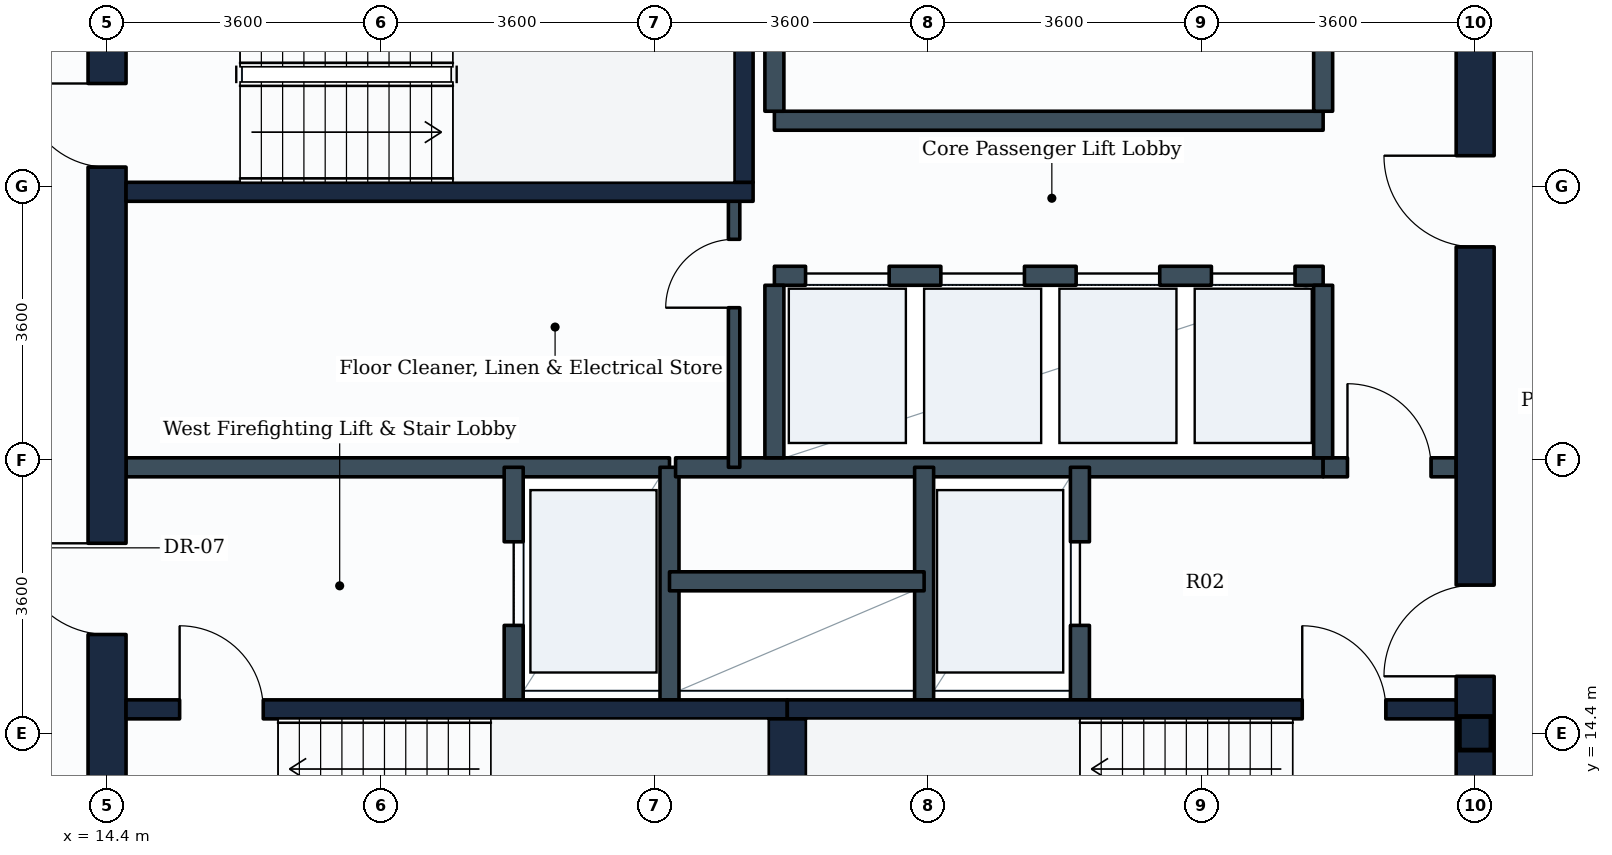
"""IFC4 building model, lengths in metres.
Left out: names, types, materials, properties, quantities, classifications, styles, units other than length and angle.
Written with IfcOpenShell. Run it as: python <this file> out.ifc"""

import sys

from ifc_helpers import new_model, si_unit, direction, frame, frame_2d, origin, origin_2d, place, context, subcontext, project, spatial, rectangle, i_section, extrude, element, fill, save


model = new_model("IFC4")
c1 = context("Model", 3, precision=1e-05, world=origin(), true_north=direction((0.0, 1.0)))
c2 = subcontext(c1, "Body", "Model", "MODEL_VIEW")
j1 = project(units=[si_unit("LENGTHUNIT", "METRE"), si_unit("PLANEANGLEUNIT", "RADIAN")], contexts=[c1])
p1 = place(None, origin())
s1 = spatial("IfcSite", under=j1, at=p1, CompositionType="ELEMENT")
p2 = place(p1, origin())
s2 = spatial("IfcBuilding", under=s1, at=p2, CompositionType="ELEMENT")
p3 = place(p2, frame((0.0, 0.0, 127.6)))
s3 = spatial("IfcBuildingStorey", under=s2, at=p3, CompositionType="ELEMENT", Elevation=127.6)
p4 = place(p3, frame((32.4, 14.4, 0.0), z_axis=(0.0, 0.0, 1.0), x_axis=(1.0, 0.0, 0.0)))
e1 = element("IfcColumn", 1, at=p4, inside=s3, PredefinedType="COLUMN", context=c2, shape_type="SweptSolid", body=[
    extrude(i_section(OverallWidth=0.416, OverallDepth=0.442, WebThickness=0.025, FlangeThickness=0.041, FilletRadius=0.015, at=origin_2d()), origin(), (0.0, 0.0, 1.0), 3.8),
])
p5 = place(p3, frame((14.4, 10.8, 0.0), z_axis=(0.0, 0.0, 1.0), x_axis=(0.0, 1.0, 0.0)))
e2 = element("IfcWall", 2, at=p5, inside=s3, PredefinedType="SHEAR", context=c2, shape_type="SweptSolid", body=[
    extrude(rectangle(XDim=14.4, YDim=0.5, at=frame_2d((7.2, 0.0))), origin(), (0.0, 0.0, 1.0), 3.55),
])
p6 = place(p5, frame((11.05, 0.0, 0.0)))
e3 = element("IfcOpeningElement", 3, at=p6, cuts=e2, PredefinedType="OPENING", context=c2, shape_type="SweptSolid", body=[
    extrude(rectangle(XDim=1.1, YDim=2.1, at=frame_2d((0.55, 1.05))), frame((0.0, 0.26, 0.0), z_axis=(0.0, -1.0, 0.0), x_axis=(1.0, 0.0, 0.0)), (0.0, 0.0, 1.0), 0.52),
])
p7 = place(p5, frame((4.9, 0.0, 0.0)))
e4 = element("IfcOpeningElement", 4, at=p7, cuts=e2, PredefinedType="OPENING", context=c2, shape_type="SweptSolid", body=[
    extrude(rectangle(XDim=1.2, YDim=2.1, at=frame_2d((0.6, 1.05))), frame((0.0, 0.26, 0.0), z_axis=(0.0, -1.0, 0.0), x_axis=(1.0, 0.0, 0.0)), (0.0, 0.0, 1.0), 0.52),
])
p8 = place(p3, frame((32.4, 10.8, 0.0), z_axis=(0.0, 0.0, 1.0), x_axis=(0.0, 1.0, 0.0)))
e5 = element("IfcWall", 5, at=p8, inside=s3, PredefinedType="SHEAR", context=c2, shape_type="SweptSolid", body=[
    extrude(rectangle(XDim=14.4, YDim=0.5, at=frame_2d((7.2, 0.0))), origin(), (0.0, 0.0, 1.0), 3.55),
])
p9 = place(p8, frame((4.35, 0.0, 0.0)))
e6 = element("IfcOpeningElement", 6, at=p9, cuts=e5, PredefinedType="OPENING", context=c2, shape_type="SweptSolid", body=[
    extrude(rectangle(XDim=1.2, YDim=2.1, at=frame_2d((0.6, 1.05))), frame((0.0, 0.26, 0.0), z_axis=(0.0, -1.0, 0.0), x_axis=(1.0, 0.0, 0.0)), (0.0, 0.0, 1.0), 0.52),
])
p10 = place(p8, frame((10.0, 0.0, 0.0)))
e7 = element("IfcOpeningElement", 7, at=p10, cuts=e5, PredefinedType="OPENING", context=c2, shape_type="SweptSolid", body=[
    extrude(rectangle(XDim=1.2, YDim=2.1, at=frame_2d((0.6, 1.05))), frame((0.0, 0.26, 0.0), z_axis=(0.0, -1.0, 0.0), x_axis=(1.0, 0.0, 0.0)), (0.0, 0.0, 1.0), 0.52),
])
p11 = place(p3, frame((14.65, 14.715, 0.0), z_axis=(0.0, 0.0, 1.0), x_axis=(1.0, 0.0, 0.0)))
e8 = element("IfcWall", 8, at=p11, inside=s3, PredefinedType="SHEAR", context=c2, shape_type="SweptSolid", body=[
    extrude(rectangle(XDim=8.7, YDim=0.25, at=frame_2d((4.35, 0.0))), origin(), (0.0, 0.0, 1.0), 3.55),
])
p12 = place(p11, frame((0.705, 0.0, 0.0)))
e9 = element("IfcOpeningElement", 9, at=p12, cuts=e8, PredefinedType="OPENING", context=c2, shape_type="SweptSolid", body=[
    extrude(rectangle(XDim=1.1, YDim=2.1, at=frame_2d((0.55, 1.05))), frame((0.0, 0.135, 0.0), z_axis=(0.0, -1.0, 0.0), x_axis=(1.0, 0.0, 0.0)), (0.0, 0.0, 1.0), 0.27),
])
p13 = place(p3, frame((23.35, 14.715, 0.0), z_axis=(0.0, 0.0, 1.0), x_axis=(1.0, 0.0, 0.0)))
e10 = element("IfcWall", 10, at=p13, inside=s3, PredefinedType="SHEAR", context=c2, shape_type="SweptSolid", body=[
    extrude(rectangle(XDim=8.8, YDim=0.25, at=frame_2d((4.4, 0.0))), origin(), (0.0, 0.0, 1.0), 3.55),
])
p14 = place(p13, frame((6.775, 0.0, 0.0)))
e11 = element("IfcOpeningElement", 11, at=p14, cuts=e10, PredefinedType="OPENING", context=c2, shape_type="SweptSolid", body=[
    extrude(rectangle(XDim=1.1, YDim=2.1, at=frame_2d((0.55, 1.05))), frame((0.0, 0.135, 0.0), z_axis=(0.0, -1.0, 0.0), x_axis=(1.0, 0.0, 0.0)), (0.0, 0.0, 1.0), 0.27),
])
p15 = place(p3, frame((23.35, 11.75, 0.0), z_axis=(0.0, 0.0, 1.0), x_axis=(0.0, 1.0, 0.0)))
e12 = element("IfcWall", 12, at=p15, inside=s3, PredefinedType="SHEAR", context=c2, shape_type="SweptSolid", body=[
    extrude(rectangle(XDim=2.84, YDim=0.5, at=frame_2d((1.42, 0.0))), origin(), (0.0, 0.0, 1.0), 3.55),
])
p16 = place(p3, frame((14.65, 21.525, 0.0), z_axis=(0.0, 0.0, 1.0), x_axis=(1.0, 0.0, 0.0)))
e13 = element("IfcWall", 13, at=p16, inside=s3, PredefinedType="SHEAR", context=c2, shape_type="SweptSolid", body=[
    extrude(rectangle(XDim=8.25, YDim=0.25, at=frame_2d((4.125, 0.0))), origin(), (0.0, 0.0, 1.0), 3.55),
])
p17 = place(p3, frame((22.775, 21.65, 0.0), z_axis=(0.0, 0.0, 1.0), x_axis=(0.0, 1.0, 0.0)))
e14 = element("IfcWall", 14, at=p17, inside=s3, PredefinedType="SHEAR", context=c2, shape_type="SweptSolid", body=[
    extrude(rectangle(XDim=2.84, YDim=0.25, at=frame_2d((1.42, 0.0))), origin(), (0.0, 0.0, 1.0), 3.55),
])
p18 = place(p3, frame((14.65, 17.9, 0.0), z_axis=(0.0, 0.0, 1.0), x_axis=(1.0, 0.0, 0.0)))
e15 = element("IfcWall", 15, at=p18, inside=s3, PredefinedType="PARTITIONING", context=c2, shape_type="SweptSolid", body=[
    extrude(rectangle(XDim=7.15, YDim=0.25, at=frame_2d((3.575, 0.0))), origin(), (0.0, 0.0, 1.0), 3.535),
])
p19 = place(p3, frame((19.75, 14.84, 0.0), z_axis=(0.0, 0.0, 1.0), x_axis=(0.0, 1.0, 0.0)))
e16 = element("IfcWall", 16, at=p19, inside=s3, PredefinedType="PARTITIONING", context=c2, shape_type="SweptSolid", body=[
    extrude(rectangle(XDim=3.06, YDim=0.25, at=frame_2d((1.53, 0.0))), origin(), (0.0, 0.0, 1.0), 3.535),
])
p20 = place(p19, frame((0.98, 0.0, 0.0)))
e17 = element("IfcOpeningElement", 17, at=p20, cuts=e16, PredefinedType="OPENING", context=c2, shape_type="SweptSolid", body=[
    extrude(rectangle(XDim=1.1, YDim=2.1, at=frame_2d((0.55, 1.05))), frame((0.0, 0.135, 0.0), z_axis=(0.0, -1.0, 0.0), x_axis=(1.0, 0.0, 0.0)), (0.0, 0.0, 1.0), 0.27),
])
p21 = place(p3, frame((21.8, 14.84, 0.0), z_axis=(0.0, 0.0, 1.0), x_axis=(0.0, 1.0, 0.0)))
e18 = element("IfcWall", 18, at=p21, inside=s3, PredefinedType="PARTITIONING", context=c2, shape_type="SweptSolid", body=[
    extrude(rectangle(XDim=3.06, YDim=0.25, at=frame_2d((1.53, 0.0))), origin(), (0.0, 0.0, 1.0), 3.535),
])
p22 = place(p3, frame((21.88, 17.9, 0.0), z_axis=(0.0, 0.0, 1.0), x_axis=(1.0, 0.0, 0.0)))
e19 = element("IfcWall", 19, at=p22, inside=s3, PredefinedType="PARTITIONING", context=c2, shape_type="SweptSolid", body=[
    extrude(rectangle(XDim=8.52, YDim=0.25, at=frame_2d((4.26, 0.0))), origin(), (0.0, 0.0, 1.0), 3.535),
])
p23 = place(p3, frame((30.4, 17.9, 0.0), z_axis=(0.0, 0.0, 1.0), x_axis=(1.0, 0.0, 0.0)))
e20 = element("IfcWall", 20, at=p23, inside=s3, PredefinedType="PARTITIONING", context=c2, shape_type="SweptSolid", body=[
    extrude(rectangle(XDim=1.75, YDim=0.25, at=frame_2d((0.875, 0.0))), origin(), (0.0, 0.0, 1.0), 3.535),
])
p24 = place(p23, frame((0.32, 0.0, 0.0)))
e21 = element("IfcOpeningElement", 21, at=p24, cuts=e20, PredefinedType="OPENING", context=c2, shape_type="SweptSolid", body=[
    extrude(rectangle(XDim=1.1, YDim=2.1, at=frame_2d((0.55, 1.05))), frame((0.0, 0.135, 0.0), z_axis=(0.0, -1.0, 0.0), x_axis=(1.0, 0.0, 0.0)), (0.0, 0.0, 1.0), 0.27),
])
p25 = place(p3, frame((25.15, 14.84, 0.0), z_axis=(0.0, 0.0, 1.0), x_axis=(0.0, 1.0, 0.0)))
e22 = element("IfcWall", 22, at=p25, inside=s3, PredefinedType="PARTITIONING", context=c2, shape_type="SweptSolid", body=[
    extrude(rectangle(XDim=3.06, YDim=0.25, at=frame_2d((1.53, 0.0))), origin(), (0.0, 0.0, 1.0), 3.535),
])
p26 = place(p3, frame((27.2, 14.84, 0.0), z_axis=(0.0, 0.0, 1.0), x_axis=(0.0, 1.0, 0.0)))
e23 = element("IfcWall", 23, at=p26, inside=s3, PredefinedType="PARTITIONING", context=c2, shape_type="SweptSolid", body=[
    extrude(rectangle(XDim=3.06, YDim=0.25, at=frame_2d((1.53, 0.0))), origin(), (0.0, 0.0, 1.0), 3.535),
])
p27 = place(p26, frame((0.98, 0.0, 0.0)))
e24 = element("IfcOpeningElement", 24, at=p27, cuts=e23, PredefinedType="OPENING", context=c2, shape_type="SweptSolid", body=[
    extrude(rectangle(XDim=1.1, YDim=2.1, at=frame_2d((0.55, 1.05))), frame((0.0, 0.135, 0.0), z_axis=(0.0, -1.0, 0.0), x_axis=(1.0, 0.0, 0.0)), (0.0, 0.0, 1.0), 0.27),
])
p28 = place(p3, frame((21.8, 16.4, 0.0), z_axis=(0.0, 0.0, 1.0), x_axis=(1.0, 0.0, 0.0)))
e25 = element("IfcWall", 25, at=p28, inside=s3, PredefinedType="PARTITIONING", context=c2, shape_type="SweptSolid", body=[
    extrude(rectangle(XDim=3.35, YDim=0.25, at=frame_2d((1.675, 0.0))), origin(), (0.0, 0.0, 1.0), 3.535),
])
p29 = place(p3, frame((23.18, 20.42, 0.0), z_axis=(0.0, 0.0, 1.0), x_axis=(1.0, 0.0, 0.0)))
e26 = element("IfcWall", 26, at=p29, inside=s3, PredefinedType="PARTITIONING", context=c2, shape_type="SweptSolid", body=[
    extrude(rectangle(XDim=7.22, YDim=0.25, at=frame_2d((3.61, 0.0))), origin(), (0.0, 0.0, 1.0), 3.535),
])
p30 = place(p29, frame((0.41, 0.0, 0.0)))
e27 = element("IfcOpeningElement", 27, at=p30, cuts=e26, PredefinedType="OPENING", context=c2, shape_type="SweptSolid", body=[
    extrude(rectangle(XDim=1.1, YDim=2.1, at=frame_2d((0.55, 1.05))), frame((0.0, 0.135, 0.0), z_axis=(0.0, -1.0, 0.0), x_axis=(1.0, 0.0, 0.0)), (0.0, 0.0, 1.0), 0.27),
])
p31 = place(p29, frame((2.19, 0.0, 0.0)))
e28 = element("IfcOpeningElement", 28, at=p31, cuts=e26, PredefinedType="OPENING", context=c2, shape_type="SweptSolid", body=[
    extrude(rectangle(XDim=1.1, YDim=2.1, at=frame_2d((0.55, 1.05))), frame((0.0, 0.135, 0.0), z_axis=(0.0, -1.0, 0.0), x_axis=(1.0, 0.0, 0.0)), (0.0, 0.0, 1.0), 0.27),
])
p32 = place(p29, frame((3.97, 0.0, 0.0)))
e29 = element("IfcOpeningElement", 29, at=p32, cuts=e26, PredefinedType="OPENING", context=c2, shape_type="SweptSolid", body=[
    extrude(rectangle(XDim=1.1, YDim=2.1, at=frame_2d((0.55, 1.05))), frame((0.0, 0.135, 0.0), z_axis=(0.0, -1.0, 0.0), x_axis=(1.0, 0.0, 0.0)), (0.0, 0.0, 1.0), 0.27),
])
p33 = place(p29, frame((5.75, 0.0, 0.0)))
e30 = element("IfcOpeningElement", 30, at=p33, cuts=e26, PredefinedType="OPENING", context=c2, shape_type="SweptSolid", body=[
    extrude(rectangle(XDim=1.1, YDim=2.1, at=frame_2d((0.55, 1.05))), frame((0.0, 0.135, 0.0), z_axis=(0.0, -1.0, 0.0), x_axis=(1.0, 0.0, 0.0)), (0.0, 0.0, 1.0), 0.27),
])
for number, where, z_axis, x_axis in (
    (31, (23.18, 18.025, 0.0), (0.0, 0.0, 1.0), (0.0, 1.0, 0.0)),
    (32, (30.4, 18.025, 0.0), (0.0, 0.0, 1.0), (0.0, 1.0, 0.0)),
):
    element("IfcWall", number, at=place(p3, frame(where, z_axis=z_axis, x_axis=x_axis)), inside=s3, PredefinedType="PARTITIONING", context=c2, shape_type="SweptSolid", body=[
        extrude(rectangle(XDim=2.27, YDim=0.25, at=frame_2d((1.135, 0.0))), origin(), (0.0, 0.0, 1.0), 3.535),
    ])
p34 = place(p3, frame((23.18, 22.46, 0.0), z_axis=(0.0, 0.0, 1.0), x_axis=(1.0, 0.0, 0.0)))
e33 = element("IfcWall", 33, at=p34, inside=s3, PredefinedType="PARTITIONING", context=c2, shape_type="SweptSolid", body=[
    extrude(rectangle(XDim=7.22, YDim=0.25, at=frame_2d((3.61, 0.0))), origin(), (0.0, 0.0, 1.0), 3.535),
])
for number, where, z_axis, x_axis in (
    (34, (23.18, 22.585, 0.0), (0.0, 0.0, 1.0), (0.0, 1.0, 0.0)),
    (35, (30.4, 22.585, 0.0), (0.0, 0.0, 1.0), (0.0, 1.0, 0.0)),
):
    element("IfcWall", number, at=place(p3, frame(where, z_axis=z_axis, x_axis=x_axis)), inside=s3, PredefinedType="PARTITIONING", context=c2, shape_type="SweptSolid", body=[
        extrude(rectangle(XDim=2.315, YDim=0.25, at=frame_2d((1.157, 0.0))), origin(), (0.0, 0.0, 1.0), 3.535),
    ])
p35 = place(p3, frame((22.65, 17.9, 0.0), z_axis=(0.0, 0.0, 1.0), x_axis=(0.0, 1.0, 0.0)))
e36 = element("IfcWall", 36, at=p35, inside=s3, PredefinedType="PARTITIONING", context=c2, shape_type="SweptSolid", body=[
    extrude(rectangle(XDim=3.625, YDim=0.15, at=frame_2d((1.812, 0.0))), origin(), (0.0, 0.0, 1.0), 3.535),
])
p36 = place(p35, frame((2.1, 0.0, 0.0)))
e37 = element("IfcOpeningElement", 37, at=p36, cuts=e36, PredefinedType="OPENING", context=c2, shape_type="SweptSolid", body=[
    extrude(rectangle(XDim=0.9, YDim=2.1, at=frame_2d((0.45, 1.05))), frame((0.0, 0.085, 0.0), z_axis=(0.0, -1.0, 0.0), x_axis=(1.0, 0.0, 0.0)), (0.0, 0.0, 1.0), 0.17),
])
p37 = place(p12, origin())
e38 = element("IfcDoor", 38, at=p37, inside=s3, OperationType="SINGLE_SWING_LEFT", PredefinedType="DOOR", context=c2, shape_type="SweptSolid", body=[
    extrude(rectangle(XDim=1.1, YDim=2.1, at=frame_2d((0.55, 1.05))), frame((0.0, 0.025, 0.0), z_axis=(0.0, -1.0, 0.0), x_axis=(1.0, 0.0, 0.0)), (0.0, 0.0, 1.0), 0.05),
])
fill(e9, e38)
p38 = place(p14, origin())
e39 = element("IfcDoor", 39, at=p38, inside=s3, OperationType="SINGLE_SWING_LEFT", PredefinedType="DOOR", context=c2, shape_type="SweptSolid", body=[
    extrude(rectangle(XDim=1.1, YDim=2.1, at=frame_2d((0.55, 1.05))), frame((0.0, 0.025, 0.0), z_axis=(0.0, -1.0, 0.0), x_axis=(1.0, 0.0, 0.0)), (0.0, 0.0, 1.0), 0.05),
])
fill(e11, e39)
p39 = place(p6, origin())
e40 = element("IfcDoor", 40, at=p39, inside=s3, OperationType="SINGLE_SWING_RIGHT", PredefinedType="DOOR", context=c2, shape_type="SweptSolid", body=[
    extrude(rectangle(XDim=1.1, YDim=2.1, at=frame_2d((0.55, 1.05))), frame((0.0, 0.025, 0.0), z_axis=(0.0, -1.0, 0.0), x_axis=(1.0, 0.0, 0.0)), (0.0, 0.0, 1.0), 0.05),
])
fill(e3, e40)
p40 = place(p20, origin())
e41 = element("IfcDoor", 41, at=p40, inside=s3, OperationType="SLIDING_TO_LEFT", PredefinedType="DOOR", context=c2, shape_type="SweptSolid", body=[
    extrude(rectangle(XDim=1.1, YDim=2.1, at=frame_2d((0.55, 1.05))), frame((0.0, 0.025, 0.0), z_axis=(0.0, -1.0, 0.0), x_axis=(1.0, 0.0, 0.0)), (0.0, 0.0, 1.0), 0.05),
])
fill(e17, e41)
p41 = place(p27, origin())
e42 = element("IfcDoor", 42, at=p41, inside=s3, OperationType="SLIDING_TO_LEFT", PredefinedType="DOOR", context=c2, shape_type="SweptSolid", body=[
    extrude(rectangle(XDim=1.1, YDim=2.1, at=frame_2d((0.55, 1.05))), frame((0.0, 0.025, 0.0), z_axis=(0.0, -1.0, 0.0), x_axis=(1.0, 0.0, 0.0)), (0.0, 0.0, 1.0), 0.05),
])
fill(e24, e42)
p42 = place(p7, origin())
e43 = element("IfcDoor", 43, at=p42, inside=s3, OperationType="SINGLE_SWING_RIGHT", PredefinedType="DOOR", context=c2, shape_type="SweptSolid", body=[
    extrude(rectangle(XDim=1.2, YDim=2.1, at=frame_2d((0.6, 1.05))), frame((0.0, 0.025, 0.0), z_axis=(0.0, -1.0, 0.0), x_axis=(1.0, 0.0, 0.0)), (0.0, 0.0, 1.0), 0.05),
])
fill(e4, e43)
p43 = place(p9, origin())
e44 = element("IfcDoor", 44, at=p43, inside=s3, OperationType="SINGLE_SWING_LEFT", PredefinedType="DOOR", context=c2, shape_type="SweptSolid", body=[
    extrude(rectangle(XDim=1.2, YDim=2.1, at=frame_2d((0.6, 1.05))), frame((0.0, 0.025, 0.0), z_axis=(0.0, -1.0, 0.0), x_axis=(1.0, 0.0, 0.0)), (0.0, 0.0, 1.0), 0.05),
])
fill(e6, e44)
p44 = place(p24, origin())
e45 = element("IfcDoor", 45, at=p44, inside=s3, OperationType="SINGLE_SWING_LEFT", PredefinedType="DOOR", context=c2, shape_type="SweptSolid", body=[
    extrude(rectangle(XDim=1.1, YDim=2.1, at=frame_2d((0.55, 1.05))), frame((0.0, 0.025, 0.0), z_axis=(0.0, -1.0, 0.0), x_axis=(1.0, 0.0, 0.0)), (0.0, 0.0, 1.0), 0.05),
])
fill(e21, e45)
p45 = place(p30, origin())
e46 = element("IfcDoor", 46, at=p45, inside=s3, OperationType="SLIDING_TO_LEFT", PredefinedType="DOOR", context=c2, shape_type="SweptSolid", body=[
    extrude(rectangle(XDim=1.1, YDim=2.1, at=frame_2d((0.55, 1.05))), frame((0.0, 0.025, 0.0), z_axis=(0.0, -1.0, 0.0), x_axis=(1.0, 0.0, 0.0)), (0.0, 0.0, 1.0), 0.05),
])
fill(e27, e46)
p46 = place(p31, origin())
e47 = element("IfcDoor", 47, at=p46, inside=s3, OperationType="SLIDING_TO_LEFT", PredefinedType="DOOR", context=c2, shape_type="SweptSolid", body=[
    extrude(rectangle(XDim=1.1, YDim=2.1, at=frame_2d((0.55, 1.05))), frame((0.0, 0.025, 0.0), z_axis=(0.0, -1.0, 0.0), x_axis=(1.0, 0.0, 0.0)), (0.0, 0.0, 1.0), 0.05),
])
fill(e28, e47)
p47 = place(p32, origin())
e48 = element("IfcDoor", 48, at=p47, inside=s3, OperationType="SLIDING_TO_LEFT", PredefinedType="DOOR", context=c2, shape_type="SweptSolid", body=[
    extrude(rectangle(XDim=1.1, YDim=2.1, at=frame_2d((0.55, 1.05))), frame((0.0, 0.025, 0.0), z_axis=(0.0, -1.0, 0.0), x_axis=(1.0, 0.0, 0.0)), (0.0, 0.0, 1.0), 0.05),
])
fill(e29, e48)
p48 = place(p33, origin())
e49 = element("IfcDoor", 49, at=p48, inside=s3, OperationType="SLIDING_TO_LEFT", PredefinedType="DOOR", context=c2, shape_type="SweptSolid", body=[
    extrude(rectangle(XDim=1.1, YDim=2.1, at=frame_2d((0.55, 1.05))), frame((0.0, 0.025, 0.0), z_axis=(0.0, -1.0, 0.0), x_axis=(1.0, 0.0, 0.0)), (0.0, 0.0, 1.0), 0.05),
])
fill(e30, e49)
p49 = place(p10, origin())
e50 = element("IfcDoor", 50, at=p49, inside=s3, OperationType="SINGLE_SWING_RIGHT", PredefinedType="DOOR", context=c2, shape_type="SweptSolid", body=[
    extrude(rectangle(XDim=1.2, YDim=2.1, at=frame_2d((0.6, 1.05))), frame((0.0, 0.025, 0.0), z_axis=(0.0, -1.0, 0.0), x_axis=(1.0, 0.0, 0.0)), (0.0, 0.0, 1.0), 0.05),
])
fill(e7, e50)
p50 = place(p36, origin())
e51 = element("IfcDoor", 51, at=p50, inside=s3, OperationType="SINGLE_SWING_LEFT", PredefinedType="DOOR", context=c2, shape_type="SweptSolid", body=[
    extrude(rectangle(XDim=0.9, YDim=2.1, at=frame_2d((0.45, 1.05))), frame((0.0, 0.025, 0.0), z_axis=(0.0, -1.0, 0.0), x_axis=(1.0, 0.0, 0.0)), (0.0, 0.0, 1.0), 0.05),
])
fill(e37, e51)
save(model, sys.argv[1])
